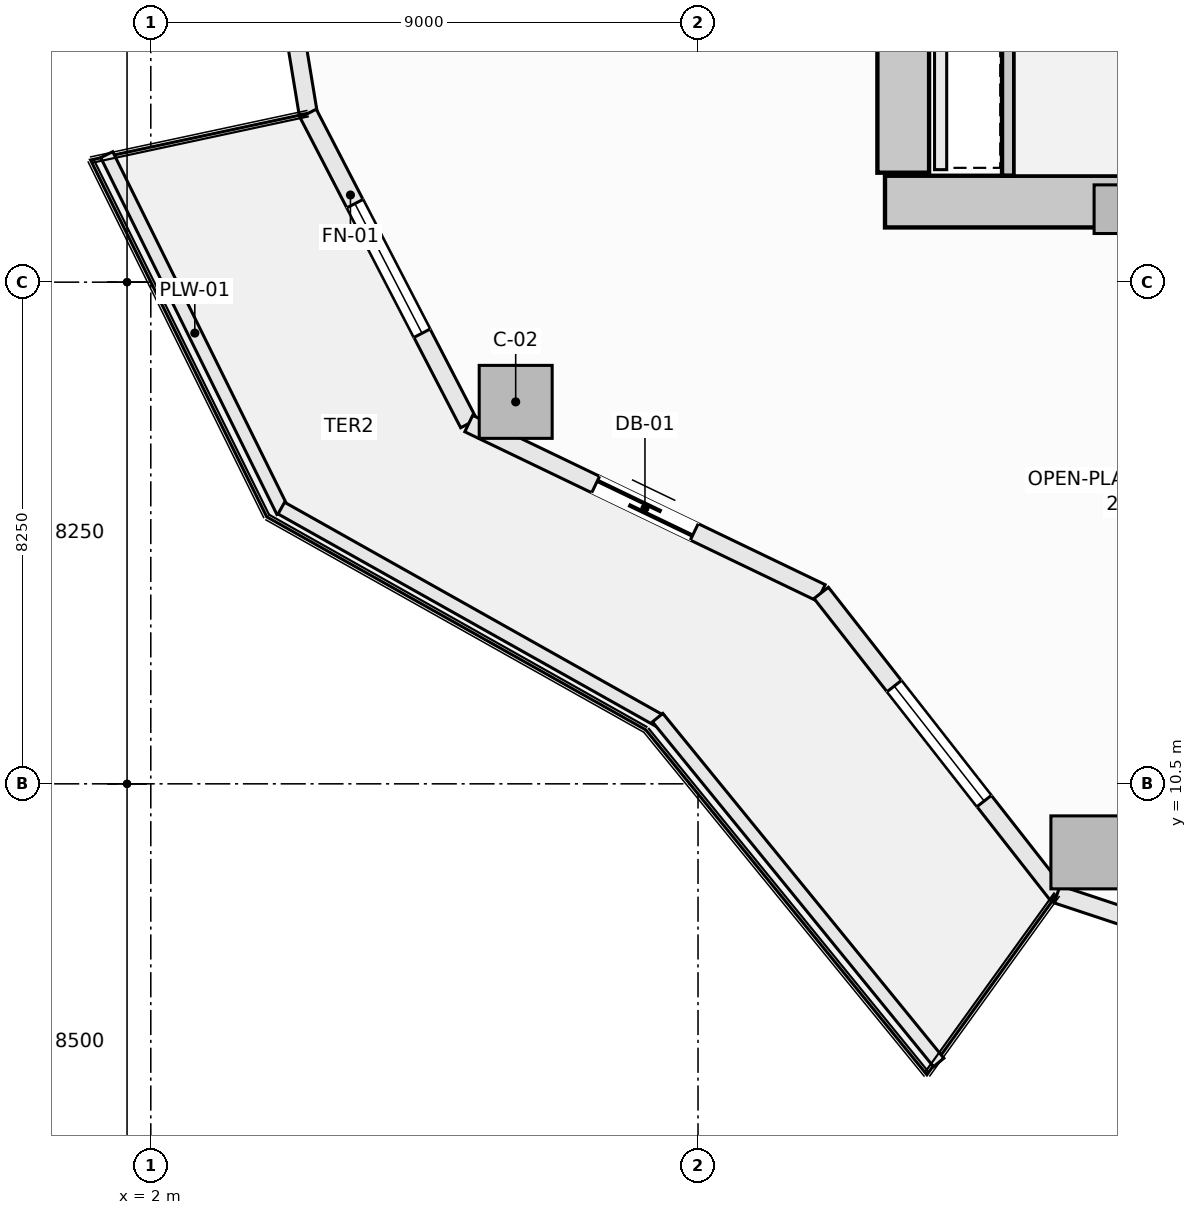
"""IFC4 building model, lengths in metres.
Left out: names, types, materials, properties, quantities, classifications, styles, units other than length and angle.
Written with IfcOpenShell. Run it as: python <this file> out.ifc"""

import sys

from ifc_helpers import new_model, si_unit, direction, frame, frame_2d, origin, origin_2d, place, context, subcontext, project, spatial, rectangle, extrude, element, fill, save


model = new_model("IFC4")
c1 = context("Model", 3, precision=1e-05, world=origin(), true_north=direction((0.0, 1.0)))
c2 = subcontext(c1, "Body", "Model", "MODEL_VIEW")
j1 = project(units=[si_unit("LENGTHUNIT", "METRE"), si_unit("PLANEANGLEUNIT", "RADIAN")], contexts=[c1])
p1 = place(None, origin())
s1 = spatial("IfcSite", under=j1, at=p1, CompositionType="ELEMENT")
p2 = place(p1, origin())
s2 = spatial("IfcBuilding", under=s1, at=p2, CompositionType="ELEMENT")
p3 = place(p2, frame((0.0, 0.0, 72.7)))
s3 = spatial("IfcBuildingStorey", under=s2, at=p3, CompositionType="ELEMENT", Elevation=72.7)
p4 = place(p3, frame((14.075, 20.075, -0.28), z_axis=(0.0, 0.0, 1.0), x_axis=(1.0, 0.0, 0.0)))
e1 = element("IfcWall", 1, at=p4, inside=s3, PredefinedType="SHEAR", context=c2, shape_type="SweptSolid", body=[
    extrude(rectangle(XDim=13.85, YDim=0.85, at=frame_2d((6.925, 0.0))), origin(), (0.0, 0.0, 1.0), 3.85),
])
p5 = place(p3, frame((14.375, 20.55, -0.28), z_axis=(0.0, 0.0, 1.0), x_axis=(0.0, 1.0, 0.0)))
e2 = element("IfcWall", 2, at=p5, inside=s3, PredefinedType="SHEAR", context=c2, shape_type="SweptSolid", body=[
    extrude(rectangle(XDim=12.9, YDim=0.85, at=frame_2d((6.45, 0.0))), origin(), (0.0, 0.0, 1.0), 3.85),
])
for number, where, z_axis, x_axis in (
    (3, (8.001, 16.781, -0.28), (0.0, 0.0, 1.0), (1.0, 0.0, 0.0)),
    (4, (17.404, 9.373, -0.28), (0.0, 0.0, 1.0), (1.0, 0.0, 0.0)),
):
    element("IfcColumn", number, at=place(p3, frame(where, z_axis=z_axis, x_axis=x_axis)), inside=s3, PredefinedType="COLUMN", context=c2, shape_type="SweptSolid", body=[
        extrude(rectangle(XDim=1.2, YDim=1.2, at=origin_2d()), origin(), (0.0, 0.0, 1.0), 3.85),
    ])
p6 = place(p3, frame((17.914, 19.95, -0.28), z_axis=(0.0, 0.0, 1.0), x_axis=(1.0, 0.0, 0.0)))
e5 = element("IfcColumn", 5, at=p6, inside=s3, PredefinedType="PILASTER", context=c2, shape_type="SweptSolid", body=[
    extrude(rectangle(XDim=0.8, YDim=0.8, at=origin_2d()), origin(), (0.0, 0.0, 1.0), 3.85),
])
p7 = place(p3, frame((3.688, 27.0, 0.0), z_axis=(0.0, 0.0, 1.0), x_axis=(0.162386212206, -0.986727276447, 0.0)))
e6 = element("IfcWall", 6, at=p7, inside=s3, PredefinedType="SOLIDWALL", context=c2, shape_type="SweptSolid", body=[
    extrude(rectangle(XDim=5.548, YDim=0.3, at=frame_2d((2.774, 0.0))), origin(), (0.0, 0.0, 1.0), 3.093),
])
p8 = place(p7, frame((1.574, 0.0, 0.85)))
e7 = element("IfcOpeningElement", 7, at=p8, cuts=e6, PredefinedType="OPENING", context=c2, shape_type="SweptSolid", body=[
    extrude(rectangle(XDim=2.4, YDim=1.9, at=frame_2d((1.2, 0.95))), frame((0.0, 0.16, 0.0), z_axis=(0.0, -1.0, 0.0), x_axis=(1.0, 0.0, 0.0)), (0.0, 0.0, 1.0), 0.32),
])
p9 = place(p3, frame((4.588, 21.526, 0.0), z_axis=(0.0, 0.0, 1.0), x_axis=(0.459800981414, -0.888021991558, 0.0)))
e8 = element("IfcWall", 8, at=p9, inside=s3, PredefinedType="SOLIDWALL", context=c2, shape_type="SweptSolid", body=[
    extrude(rectangle(XDim=5.744, YDim=0.3, at=frame_2d((2.872, 0.0))), origin(), (0.0, 0.0, 1.0), 3.093),
])
p10 = place(p9, frame((1.672, 0.0, 0.85)))
e9 = element("IfcOpeningElement", 9, at=p10, cuts=e8, PredefinedType="OPENING", context=c2, shape_type="SweptSolid", body=[
    extrude(rectangle(XDim=2.4, YDim=1.9, at=frame_2d((1.2, 0.95))), frame((0.0, 0.16, 0.0), z_axis=(0.0, -1.0, 0.0), x_axis=(1.0, 0.0, 0.0)), (0.0, 0.0, 1.0), 0.32),
])
p11 = place(p3, frame((7.229, 16.425, 0.0), z_axis=(0.0, 0.0, 1.0), x_axis=(0.901354747727, -0.433081538224, 0.0)))
e10 = element("IfcWall", 10, at=p11, inside=s3, PredefinedType="SOLIDWALL", context=c2, shape_type="SweptSolid", body=[
    extrude(rectangle(XDim=6.431, YDim=0.3, at=frame_2d((3.215, 0.0))), origin(), (0.0, 0.0, 1.0), 3.093),
])
p12 = place(p11, frame((2.315, 0.0, 0.0)))
e11 = element("IfcOpeningElement", 11, at=p12, cuts=e10, PredefinedType="OPENING", context=c2, shape_type="SweptSolid", body=[
    extrude(rectangle(XDim=1.8, YDim=2.25, at=frame_2d((0.9, 1.125))), frame((0.0, 0.16, 0.0), z_axis=(0.0, -1.0, 0.0), x_axis=(1.0, 0.0, 0.0)), (0.0, 0.0, 1.0), 0.32),
])
p13 = place(p3, frame((13.026, 13.64, 0.0), z_axis=(0.0, 0.0, 1.0), x_axis=(0.616434798832, -0.78740595552, 0.0)))
e12 = element("IfcWall", 12, at=p13, inside=s3, PredefinedType="SOLIDWALL", context=c2, shape_type="SweptSolid", body=[
    extrude(rectangle(XDim=6.294, YDim=0.3, at=frame_2d((3.147, 0.0))), origin(), (0.0, 0.0, 1.0), 3.093),
])
p14 = place(p13, frame((1.947, 0.0, 0.85)))
e13 = element("IfcOpeningElement", 13, at=p14, cuts=e12, PredefinedType="OPENING", context=c2, shape_type="SweptSolid", body=[
    extrude(rectangle(XDim=2.4, YDim=1.9, at=frame_2d((1.2, 0.95))), frame((0.0, 0.16, 0.0), z_axis=(0.0, -1.0, 0.0), x_axis=(1.0, 0.0, 0.0)), (0.0, 0.0, 1.0), 0.32),
])
p15 = place(p3, frame((16.906, 8.684, 0.0), z_axis=(0.0, 0.0, 1.0), x_axis=(0.949245153629, -0.314537181127, 0.0)))
e14 = element("IfcWall", 14, at=p15, inside=s3, PredefinedType="SOLIDWALL", context=c2, shape_type="SweptSolid", body=[
    extrude(rectangle(XDim=6.717, YDim=0.3, at=frame_2d((3.358, 0.0))), origin(), (0.0, 0.0, 1.0), 3.093),
])
p16 = place(p15, frame((2.159, 0.0, 0.85)))
e15 = element("IfcOpeningElement", 15, at=p16, cuts=e14, PredefinedType="OPENING", context=c2, shape_type="SweptSolid", body=[
    extrude(rectangle(XDim=2.4, YDim=1.9, at=frame_2d((1.2, 0.95))), frame((0.0, 0.16, 0.0), z_axis=(0.0, -1.0, 0.0), x_axis=(1.0, 0.0, 0.0)), (0.0, 0.0, 1.0), 0.32),
])
p17 = place(p3, frame((1.275, 20.847, 0.0), z_axis=(0.0, 0.0, 1.0), x_axis=(0.442686636348, -0.89667638644, 0.0)))
e16 = element("IfcWall", 16, at=p17, inside=s3, PredefinedType="PARAPET", context=c2, shape_type="SweptSolid", body=[
    extrude(rectangle(XDim=6.545, YDim=0.22, at=frame_2d((3.272, 0.0))), origin(), (0.0, 0.0, 1.0), 0.52),
])
p18 = place(p3, frame((4.147, 15.034, 0.0), z_axis=(0.0, 0.0, 1.0), x_axis=(0.871775109335, -0.489906275468, 0.0)))
e17 = element("IfcWall", 17, at=p18, inside=s3, PredefinedType="PARAPET", context=c2, shape_type="SweptSolid", body=[
    extrude(rectangle(XDim=7.152, YDim=0.22, at=frame_2d((3.576, 0.0))), origin(), (0.0, 0.0, 1.0), 0.52),
])
p19 = place(p3, frame((10.336, 11.589, 0.0), z_axis=(0.0, 0.0, 1.0), x_axis=(0.631819273026, -0.775115737315, 0.0)))
e18 = element("IfcWall", 18, at=p19, inside=s3, PredefinedType="PARAPET", context=c2, shape_type="SweptSolid", body=[
    extrude(rectangle(XDim=7.316, YDim=0.22, at=frame_2d((3.658, 0.0))), origin(), (0.0, 0.0, 1.0), 0.52),
])
p20 = place(p3, frame((16.1, 20.502, -0.28), z_axis=(0.0, 0.0, 1.0), x_axis=(0.0, 1.0, 0.0)))
e19 = element("IfcWall", 19, at=p20, inside=s3, PredefinedType="SHEAR", context=c2, shape_type="SweptSolid", body=[
    extrude(rectangle(XDim=3.036, YDim=0.2, at=frame_2d((1.518, 0.0))), origin(), (0.0, 0.0, 1.0), 3.85),
])
p21 = place(p3, frame((14.99, 20.6, 0.0), z_axis=(0.0, 0.0, 1.0), x_axis=(0.0, 1.0, 0.0)))
e20 = element("IfcWall", 20, at=p21, inside=s3, PredefinedType="SOLIDWALL", context=c2, shape_type="SweptSolid", body=[
    extrude(rectangle(XDim=2.85, YDim=0.2, at=frame_2d((1.425, 0.0))), origin(), (0.0, 0.0, 1.0), 3.57),
])
p22 = place(p10, origin())
e21 = element("IfcWindow", 21, at=p22, inside=s3, PartitioningType="SINGLE_PANEL", PredefinedType="WINDOW", context=c2, shape_type="SweptSolid", body=[
    extrude(rectangle(XDim=2.4, YDim=1.9, at=frame_2d((1.2, 0.95))), frame((0.0, 0.03, 0.0), z_axis=(0.0, -1.0, 0.0), x_axis=(1.0, 0.0, 0.0)), (0.0, 0.0, 1.0), 0.06),
])
fill(e9, e21)
p23 = place(p12, frame((1.8, 0.0, 0.0), z_axis=(0.0, 0.0, 1.0), x_axis=(-1.0, 0.0, 0.0)))
e22 = element("IfcDoor", 22, at=p23, inside=s3, OperationType="SLIDING_TO_LEFT", PredefinedType="DOOR", context=c2, shape_type="SweptSolid", body=[
    extrude(rectangle(XDim=1.8, YDim=2.25, at=frame_2d((0.9, 1.125))), frame((0.0, 0.025, 0.0), z_axis=(0.0, -1.0, 0.0), x_axis=(1.0, 0.0, 0.0)), (0.0, 0.0, 1.0), 0.05),
])
fill(e11, e22)
p24 = place(p14, origin())
e23 = element("IfcWindow", 23, at=p24, inside=s3, PartitioningType="SINGLE_PANEL", PredefinedType="WINDOW", context=c2, shape_type="SweptSolid", body=[
    extrude(rectangle(XDim=2.4, YDim=1.9, at=frame_2d((1.2, 0.95))), frame((0.0, 0.03, 0.0), z_axis=(0.0, -1.0, 0.0), x_axis=(1.0, 0.0, 0.0)), (0.0, 0.0, 1.0), 0.06),
])
fill(e13, e23)
save(model, sys.argv[1])
